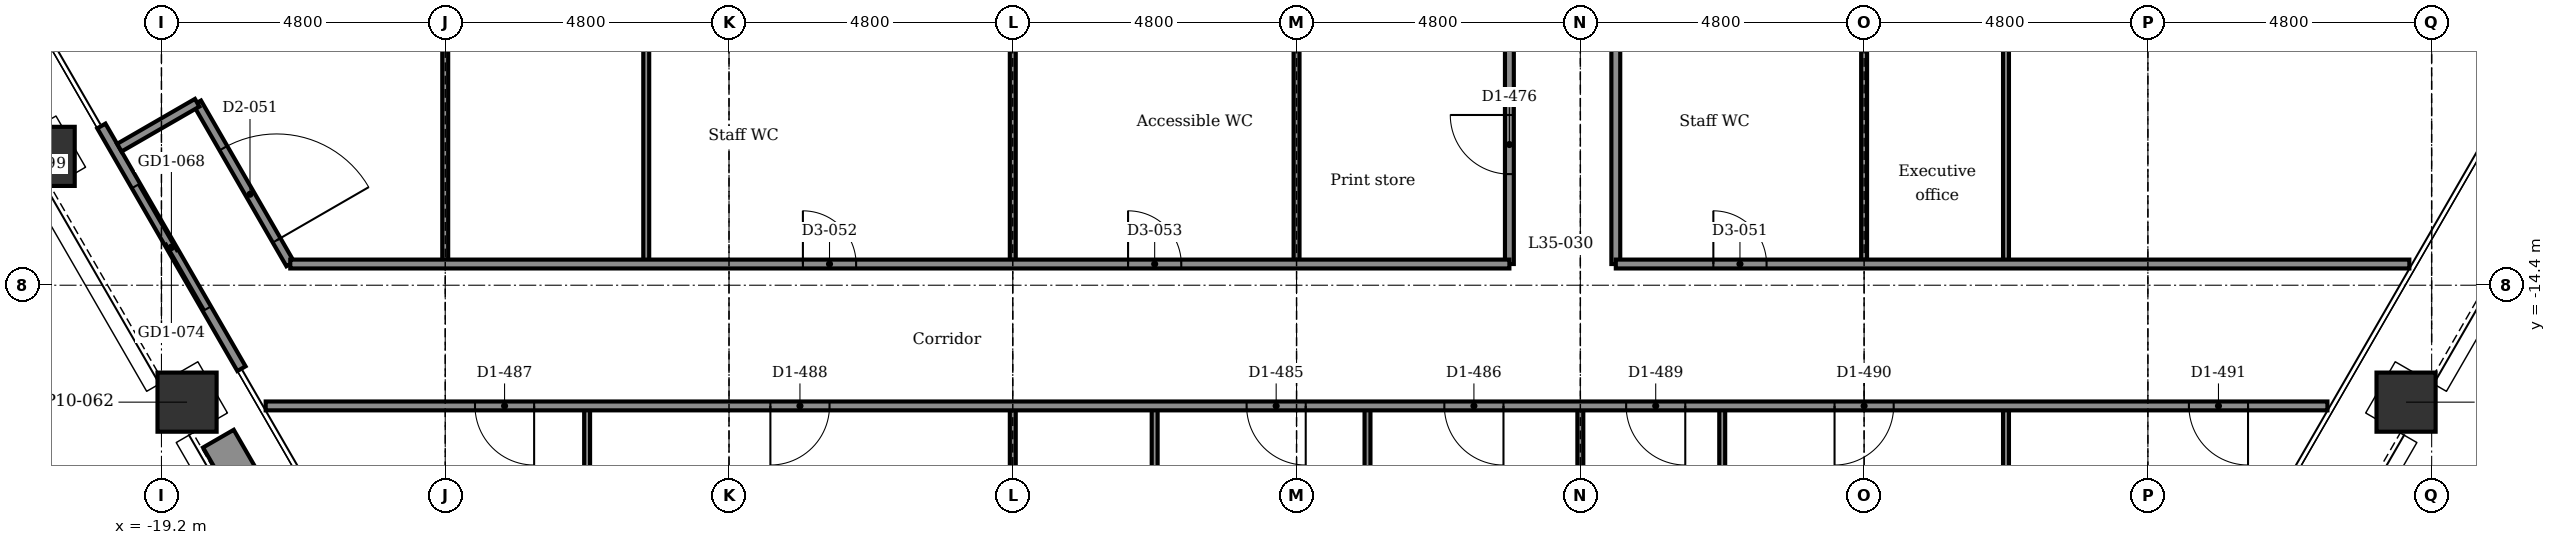
"""IFC4 building model, lengths in metres.
Left out: names, types, materials, properties, quantities, classifications, styles, units other than length and angle.
Written with IfcOpenShell. Run it as: python <this file> out.ifc"""

import sys

from ifc_helpers import new_model, si_unit, direction, frame, frame_2d, origin, origin_2d, place, context, subcontext, project, spatial, rectangle, extrude, element, fill, save


model = new_model("IFC4")
c1 = context("Model", 3, precision=1e-05, world=origin(), true_north=direction((0.0, 1.0)))
c2 = subcontext(c1, "Body", "Model", "MODEL_VIEW")
j1 = project(units=[si_unit("LENGTHUNIT", "METRE"), si_unit("PLANEANGLEUNIT", "RADIAN")], contexts=[c1])
p1 = place(None, origin())
s1 = spatial("IfcSite", under=j1, at=p1, CompositionType="ELEMENT")
p2 = place(p1, origin())
s2 = spatial("IfcBuilding", under=s1, at=p2, CompositionType="ELEMENT")
p3 = place(p2, frame((0.0, 0.0, 170.0)))
s3 = spatial("IfcBuildingStorey", under=s2, at=p3, CompositionType="ELEMENT", Elevation=170.0)
for number, where, z_axis, x_axis in (
    (1, (18.767, -16.378, -0.15), (0.0, 0.0, 1.0), (0.5, 0.866, 0.0)),
    (2, (-18.767, -16.378, -0.15), (0.0, 0.0, 1.0), (0.866, 0.5, 0.0)),
    (3, (-21.167, -12.221, -0.15), (0.0, 0.0, 1.0), (0.866, 0.5, 0.0)),
):
    element("IfcColumn", number, at=place(p3, frame(where, z_axis=z_axis, x_axis=x_axis)), inside=s3, PredefinedType="COLUMN", context=c2, shape_type="SweptSolid", body=[
        extrude(rectangle(XDim=1.0, YDim=1.0, at=origin_2d()), origin(), (0.0, 0.0, 1.0), 3.9),
    ])
p4 = place(p3, frame((-17.847, -15.812, 0.0), z_axis=(0.0, 0.0, 1.0), x_axis=(-0.5000167099, 0.866015756104, 0.0)))
e4 = element("IfcWall", 4, at=p4, inside=s3, PredefinedType="PARTITIONING", context=c2, shape_type="SweptSolid", body=[
    extrude(rectangle(XDim=4.74, YDim=0.16, at=frame_2d((2.37, 0.0))), origin(), (0.0, 0.0, 1.0), 3.75),
])
p5 = place(p4, frame((1.17, 0.0, 0.0)))
e5 = element("IfcOpeningElement", 5, at=p5, cuts=e4, PredefinedType="OPENING", context=c2, shape_type="SweptSolid", body=[
    extrude(rectangle(XDim=2.4, YDim=2.4, at=frame_2d((1.2, 1.2))), frame((0.0, 0.09, 0.0), z_axis=(0.0, -1.0, 0.0), x_axis=(1.0, 0.0, 0.0)), (0.0, 0.0, 1.0), 0.18),
])
p6 = place(p3, frame((-16.637, -19.767, 0.0), z_axis=(0.0, 0.0, 1.0), x_axis=(-0.500028443584, 0.866008981251, 0.0)))
e6 = element("IfcWall", 6, at=p6, inside=s3, PredefinedType="USERDEFINED", context=c2, shape_type="SweptSolid", body=[
    extrude(rectangle(XDim=3.2, YDim=0.6, at=frame_2d((1.6, 0.0))), origin(), (0.0, 0.0, 1.0), 0.7),
])
p7 = place(p3, frame((12.0, -23.271, 0.0), z_axis=(0.0, 0.0, 1.0), x_axis=(0.0, 1.0, 0.0)))
e7 = element("IfcWall", 7, at=p7, inside=s3, PredefinedType="PARTITIONING", context=c2, shape_type="SweptSolid", body=[
    extrude(rectangle(XDim=6.83, YDim=0.1, at=frame_2d((3.415, 0.0))), origin(), (0.0, 0.0, 1.0), 3.75),
])
p8 = place(p3, frame((12.0, -14.042, 0.0), z_axis=(0.0, 0.0, 1.0), x_axis=(0.0, 1.0, 0.0)))
e8 = element("IfcWall", 8, at=p8, inside=s3, PredefinedType="PARTITIONING", context=c2, shape_type="SweptSolid", body=[
    extrude(rectangle(XDim=27.642, YDim=0.1, at=frame_2d((13.821, 0.0))), origin(), (0.0, 0.0, 1.0), 3.75),
])
p9 = place(p3, frame((9.6, -14.042, 0.0), z_axis=(0.0, 0.0, 1.0), x_axis=(0.0, 1.0, 0.0)))
e9 = element("IfcWall", 9, at=p9, inside=s3, PredefinedType="PARTITIONING", context=c2, shape_type="SweptSolid", body=[
    extrude(rectangle(XDim=3.892, YDim=0.1, at=frame_2d((1.946, 0.0))), origin(), (0.0, 0.0, 1.0), 3.066),
])
p10 = place(p3, frame((7.2, -23.271, 0.0), z_axis=(0.0, 0.0, 1.0), x_axis=(0.0, 1.0, 0.0)))
e10 = element("IfcWall", 10, at=p10, inside=s3, PredefinedType="PARTITIONING", context=c2, shape_type="SweptSolid", body=[
    extrude(rectangle(XDim=6.83, YDim=0.1, at=frame_2d((3.415, 0.0))), origin(), (0.0, 0.0, 1.0), 3.75),
])
p11 = place(p3, frame((5.4, -14.042, 0.0), z_axis=(0.0, 0.0, 1.0), x_axis=(0.0, 1.0, 0.0)))
e11 = element("IfcWall", 11, at=p11, inside=s3, PredefinedType="PARTITIONING", context=c2, shape_type="SweptSolid", body=[
    extrude(rectangle(XDim=3.892, YDim=0.15, at=frame_2d((1.946, 0.0))), origin(), (0.0, 0.0, 1.0), 3.75),
])
p12 = place(p3, frame((4.8, -20.042, 0.0), z_axis=(0.0, 0.0, 1.0), x_axis=(0.0, 1.0, 0.0)))
e12 = element("IfcWall", 12, at=p12, inside=s3, PredefinedType="PARTITIONING", context=c2, shape_type="SweptSolid", body=[
    extrude(rectangle(XDim=3.6, YDim=0.1, at=frame_2d((1.8, 0.0))), origin(), (0.0, 0.0, 1.0), 3.066),
])
p13 = place(p3, frame((3.6, -14.042, 0.0), z_axis=(0.0, 0.0, 1.0), x_axis=(0.0, 1.0, 0.0)))
e13 = element("IfcWall", 13, at=p13, inside=s3, PredefinedType="PARTITIONING", context=c2, shape_type="SweptSolid", body=[
    extrude(rectangle(XDim=4.092, YDim=0.15, at=frame_2d((2.046, 0.0))), origin(), (0.0, 0.0, 1.0), 3.75),
])
p14 = place(p13, frame((1.521, 0.0, 0.0)))
e14 = element("IfcOpeningElement", 14, at=p14, cuts=e13, PredefinedType="OPENING", context=c2, shape_type="SweptSolid", body=[
    extrude(rectangle(XDim=1.0, YDim=2.1, at=frame_2d((0.5, 1.05))), frame((0.0, 0.085, 0.0), z_axis=(0.0, -1.0, 0.0), x_axis=(1.0, 0.0, 0.0)), (0.0, 0.0, 1.0), 0.17),
])
p15 = place(p3, frame((1.2, -20.042, 0.0), z_axis=(0.0, 0.0, 1.0), x_axis=(0.0, 1.0, 0.0)))
e15 = element("IfcWall", 15, at=p15, inside=s3, PredefinedType="PARTITIONING", context=c2, shape_type="SweptSolid", body=[
    extrude(rectangle(XDim=3.6, YDim=0.1, at=frame_2d((1.8, 0.0))), origin(), (0.0, 0.0, 1.0), 3.75),
])
p16 = place(p3, frame((0.0, -14.042, 0.0), z_axis=(0.0, 0.0, 1.0), x_axis=(0.0, 1.0, 0.0)))
e16 = element("IfcWall", 16, at=p16, inside=s3, PredefinedType="PARTITIONING", context=c2, shape_type="SweptSolid", body=[
    extrude(rectangle(XDim=4.092, YDim=0.1, at=frame_2d((2.046, 0.0))), origin(), (0.0, 0.0, 1.0), 3.066),
])
p17 = place(p3, frame((-2.4, -20.042, 0.0), z_axis=(0.0, 0.0, 1.0), x_axis=(0.0, 1.0, 0.0)))
e17 = element("IfcWall", 17, at=p17, inside=s3, PredefinedType="PARTITIONING", context=c2, shape_type="SweptSolid", body=[
    extrude(rectangle(XDim=3.6, YDim=0.1, at=frame_2d((1.8, 0.0))), origin(), (0.0, 0.0, 1.0), 3.75),
])
p18 = place(p3, frame((-4.8, -23.271, 0.0), z_axis=(0.0, 0.0, 1.0), x_axis=(0.0, 1.0, 0.0)))
e18 = element("IfcWall", 18, at=p18, inside=s3, PredefinedType="PARTITIONING", context=c2, shape_type="SweptSolid", body=[
    extrude(rectangle(XDim=6.83, YDim=0.1, at=frame_2d((3.415, 0.0))), origin(), (0.0, 0.0, 1.0), 3.066),
])
p19 = place(p3, frame((-4.8, -14.042, 0.0), z_axis=(0.0, 0.0, 1.0), x_axis=(0.0, 1.0, 0.0)))
e19 = element("IfcWall", 19, at=p19, inside=s3, PredefinedType="PARTITIONING", context=c2, shape_type="SweptSolid", body=[
    extrude(rectangle(XDim=4.092, YDim=0.1, at=frame_2d((2.046, 0.0))), origin(), (0.0, 0.0, 1.0), 3.066),
])
p20 = place(p3, frame((-11.0, -14.042, 0.0), z_axis=(0.0, 0.0, 1.0), x_axis=(0.0, 1.0, 0.0)))
e20 = element("IfcWall", 20, at=p20, inside=s3, PredefinedType="PARTITIONING", context=c2, shape_type="SweptSolid", body=[
    extrude(rectangle(XDim=4.042, YDim=0.1, at=frame_2d((2.021, 0.0))), origin(), (0.0, 0.0, 1.0), 3.75),
])
p21 = place(p3, frame((-12.0, -23.271, 0.0), z_axis=(0.0, 0.0, 1.0), x_axis=(0.0, 1.0, 0.0)))
e21 = element("IfcWall", 21, at=p21, inside=s3, PredefinedType="PARTITIONING", context=c2, shape_type="SweptSolid", body=[
    extrude(rectangle(XDim=6.83, YDim=0.1, at=frame_2d((3.415, 0.0))), origin(), (0.0, 0.0, 1.0), 3.75),
])
p22 = place(p3, frame((-14.4, -14.042, 0.0), z_axis=(0.0, 0.0, 1.0), x_axis=(0.0, 1.0, 0.0)))
e22 = element("IfcWall", 22, at=p22, inside=s3, PredefinedType="PARTITIONING", context=c2, shape_type="SweptSolid", body=[
    extrude(rectangle(XDim=4.348, YDim=0.1, at=frame_2d((2.174, 0.0))), origin(), (0.0, 0.0, 1.0), 3.066),
])
p23 = place(p3, frame((-18.596, -11.314, 0.0), z_axis=(0.0, 0.0, 1.0), x_axis=(0.499957296199, -0.866050057432, 0.0)))
e23 = element("IfcWall", 23, at=p23, inside=s3, PredefinedType="PARTITIONING", context=c2, shape_type="SweptSolid", body=[
    extrude(rectangle(XDim=3.15, YDim=0.15, at=frame_2d((1.575, 0.0))), origin(), (0.0, 0.0, 1.0), 3.75),
])
p24 = place(p23, frame((0.887, 0.0, 0.0)))
e24 = element("IfcOpeningElement", 24, at=p24, cuts=e23, PredefinedType="OPENING", context=c2, shape_type="SweptSolid", body=[
    extrude(rectangle(XDim=1.8, YDim=2.1, at=frame_2d((0.9, 1.05))), frame((0.0, 0.085, 0.0), z_axis=(0.0, -1.0, 0.0), x_axis=(1.0, 0.0, 0.0)), (0.0, 0.0, 1.0), 0.17),
])
p25 = place(p3, frame((-19.912, -12.074, 0.0), z_axis=(0.0, 0.0, 1.0), x_axis=(0.866030456496, 0.499991248344, 0.0)))
e25 = element("IfcWall", 25, at=p25, inside=s3, PredefinedType="PARTITIONING", context=c2, shape_type="SweptSolid", body=[
    extrude(rectangle(XDim=1.52, YDim=0.15, at=frame_2d((0.76, 0.0))), origin(), (0.0, 0.0, 1.0), 3.75),
])
p26 = place(p3, frame((-17.437, -16.441, 0.0), z_axis=(0.0, 0.0, 1.0), x_axis=(1.0, 0.0, 0.0)))
e26 = element("IfcWall", 26, at=p26, inside=s3, PredefinedType="PARTITIONING", context=c2, shape_type="SweptSolid", body=[
    extrude(rectangle(XDim=34.874, YDim=0.15, at=frame_2d((17.437, 0.0))), origin(), (0.0, 0.0, 1.0), 3.75),
])
p27 = place(p26, frame((16.592, 0.0, 0.0)))
e27 = element("IfcOpeningElement", 27, at=p27, cuts=e26, PredefinedType="OPENING", context=c2, shape_type="SweptSolid", body=[
    extrude(rectangle(XDim=1.0, YDim=2.1, at=frame_2d((0.5, 1.05))), frame((0.0, 0.085, 0.0), z_axis=(0.0, -1.0, 0.0), x_axis=(1.0, 0.0, 0.0)), (0.0, 0.0, 1.0), 0.17),
])
p28 = place(p26, frame((19.937, 0.0, 0.0)))
e28 = element("IfcOpeningElement", 28, at=p28, cuts=e26, PredefinedType="OPENING", context=c2, shape_type="SweptSolid", body=[
    extrude(rectangle(XDim=1.0, YDim=2.1, at=frame_2d((0.5, 1.05))), frame((0.0, 0.085, 0.0), z_axis=(0.0, -1.0, 0.0), x_axis=(1.0, 0.0, 0.0)), (0.0, 0.0, 1.0), 0.17),
])
p29 = place(p26, frame((3.541, 0.0, 0.0)))
e29 = element("IfcOpeningElement", 29, at=p29, cuts=e26, PredefinedType="OPENING", context=c2, shape_type="SweptSolid", body=[
    extrude(rectangle(XDim=1.0, YDim=2.1, at=frame_2d((0.5, 1.05))), frame((0.0, 0.085, 0.0), z_axis=(0.0, -1.0, 0.0), x_axis=(1.0, 0.0, 0.0)), (0.0, 0.0, 1.0), 0.17),
])
p30 = place(p26, frame((8.537, 0.0, 0.0)))
e30 = element("IfcOpeningElement", 30, at=p30, cuts=e26, PredefinedType="OPENING", context=c2, shape_type="SweptSolid", body=[
    extrude(rectangle(XDim=1.0, YDim=2.1, at=frame_2d((0.5, 1.05))), frame((0.0, 0.085, 0.0), z_axis=(0.0, -1.0, 0.0), x_axis=(1.0, 0.0, 0.0)), (0.0, 0.0, 1.0), 0.17),
])
p31 = place(p26, frame((23.012, 0.0, 0.0)))
e31 = element("IfcOpeningElement", 31, at=p31, cuts=e26, PredefinedType="OPENING", context=c2, shape_type="SweptSolid", body=[
    extrude(rectangle(XDim=1.0, YDim=2.1, at=frame_2d((0.5, 1.05))), frame((0.0, 0.085, 0.0), z_axis=(0.0, -1.0, 0.0), x_axis=(1.0, 0.0, 0.0)), (0.0, 0.0, 1.0), 0.17),
])
p32 = place(p26, frame((26.537, 0.0, 0.0)))
e32 = element("IfcOpeningElement", 32, at=p32, cuts=e26, PredefinedType="OPENING", context=c2, shape_type="SweptSolid", body=[
    extrude(rectangle(XDim=1.0, YDim=2.1, at=frame_2d((0.5, 1.05))), frame((0.0, 0.085, 0.0), z_axis=(0.0, -1.0, 0.0), x_axis=(1.0, 0.0, 0.0)), (0.0, 0.0, 1.0), 0.17),
])
p33 = place(p26, frame((32.531, 0.0, 0.0)))
e33 = element("IfcOpeningElement", 33, at=p33, cuts=e26, PredefinedType="OPENING", context=c2, shape_type="SweptSolid", body=[
    extrude(rectangle(XDim=1.0, YDim=2.1, at=frame_2d((0.5, 1.05))), frame((0.0, 0.085, 0.0), z_axis=(0.0, -1.0, 0.0), x_axis=(1.0, 0.0, 0.0)), (0.0, 0.0, 1.0), 0.17),
])
p34 = place(p3, frame((-17.021, -14.042, 0.0), z_axis=(0.0, 0.0, 1.0), x_axis=(1.0, 0.0, 0.0)))
e34 = element("IfcWall", 34, at=p34, inside=s3, PredefinedType="PARTITIONING", context=c2, shape_type="SweptSolid", body=[
    extrude(rectangle(XDim=20.621, YDim=0.15, at=frame_2d((10.311, 0.0))), origin(), (0.0, 0.0, 1.0), 3.75),
])
p35 = place(p34, frame((8.671, 0.0, 0.0)))
e35 = element("IfcOpeningElement", 35, at=p35, cuts=e34, PredefinedType="OPENING", context=c2, shape_type="SweptSolid", body=[
    extrude(rectangle(XDim=0.9, YDim=2.1, at=frame_2d((0.45, 1.05))), frame((0.0, 0.085, 0.0), z_axis=(0.0, -1.0, 0.0), x_axis=(1.0, 0.0, 0.0)), (0.0, 0.0, 1.0), 0.17),
])
p36 = place(p34, frame((14.171, 0.0, 0.0)))
e36 = element("IfcOpeningElement", 36, at=p36, cuts=e34, PredefinedType="OPENING", context=c2, shape_type="SweptSolid", body=[
    extrude(rectangle(XDim=0.9, YDim=2.1, at=frame_2d((0.45, 1.05))), frame((0.0, 0.085, 0.0), z_axis=(0.0, -1.0, 0.0), x_axis=(1.0, 0.0, 0.0)), (0.0, 0.0, 1.0), 0.17),
])
p37 = place(p3, frame((5.4, -14.042, 0.0), z_axis=(0.0, 0.0, 1.0), x_axis=(1.0, 0.0, 0.0)))
e37 = element("IfcWall", 37, at=p37, inside=s3, PredefinedType="PARTITIONING", context=c2, shape_type="SweptSolid", body=[
    extrude(rectangle(XDim=13.423, YDim=0.15, at=frame_2d((6.711, 0.0))), origin(), (0.0, 0.0, 1.0), 3.75),
])
p38 = place(p37, frame((1.65, 0.0, 0.0)))
e38 = element("IfcOpeningElement", 38, at=p38, cuts=e37, PredefinedType="OPENING", context=c2, shape_type="SweptSolid", body=[
    extrude(rectangle(XDim=0.9, YDim=2.1, at=frame_2d((0.45, 1.05))), frame((0.0, 0.085, 0.0), z_axis=(0.0, -1.0, 0.0), x_axis=(1.0, 0.0, 0.0)), (0.0, 0.0, 1.0), 0.17),
])
p39 = place(p5, origin())
e39 = element("IfcDoor", 39, at=p39, inside=s3, OperationType="DOUBLE_DOOR_SLIDING", PredefinedType="DOOR", context=c2, shape_type="SweptSolid", body=[
    extrude(rectangle(XDim=2.4, YDim=2.4, at=frame_2d((1.2, 1.2))), frame((0.0, 0.025, 0.0), z_axis=(0.0, -1.0, 0.0), x_axis=(1.0, 0.0, 0.0)), (0.0, 0.0, 1.0), 0.05),
])
fill(e5, e39)
p40 = place(p38, origin())
e40 = element("IfcDoor", 40, at=p40, inside=s3, OperationType="SINGLE_SWING_LEFT", PredefinedType="DOOR", context=c2, shape_type="SweptSolid", body=[
    extrude(rectangle(XDim=0.9, YDim=2.1, at=frame_2d((0.45, 1.05))), frame((0.0, 0.025, 0.0), z_axis=(0.0, -1.0, 0.0), x_axis=(1.0, 0.0, 0.0)), (0.0, 0.0, 1.0), 0.05),
])
fill(e38, e40)
p41 = place(p35, origin())
e41 = element("IfcDoor", 41, at=p41, inside=s3, OperationType="SINGLE_SWING_LEFT", PredefinedType="DOOR", context=c2, shape_type="SweptSolid", body=[
    extrude(rectangle(XDim=0.9, YDim=2.1, at=frame_2d((0.45, 1.05))), frame((0.0, 0.025, 0.0), z_axis=(0.0, -1.0, 0.0), x_axis=(1.0, 0.0, 0.0)), (0.0, 0.0, 1.0), 0.05),
])
fill(e35, e41)
p42 = place(p36, origin())
e42 = element("IfcDoor", 42, at=p42, inside=s3, OperationType="SINGLE_SWING_LEFT", PredefinedType="DOOR", context=c2, shape_type="SweptSolid", body=[
    extrude(rectangle(XDim=0.9, YDim=2.1, at=frame_2d((0.45, 1.05))), frame((0.0, 0.025, 0.0), z_axis=(0.0, -1.0, 0.0), x_axis=(1.0, 0.0, 0.0)), (0.0, 0.0, 1.0), 0.05),
])
fill(e36, e42)
p43 = place(p14, origin())
e43 = element("IfcDoor", 43, at=p43, inside=s3, OperationType="SINGLE_SWING_RIGHT", PredefinedType="DOOR", context=c2, shape_type="SweptSolid", body=[
    extrude(rectangle(XDim=1.0, YDim=2.1, at=frame_2d((0.5, 1.05))), frame((0.0, 0.025, 0.0), z_axis=(0.0, -1.0, 0.0), x_axis=(1.0, 0.0, 0.0)), (0.0, 0.0, 1.0), 0.05),
])
fill(e14, e43)
p44 = place(p27, frame((1.0, 0.0, 0.0), z_axis=(0.0, 0.0, 1.0), x_axis=(-1.0, 0.0, 0.0)))
e44 = element("IfcDoor", 44, at=p44, inside=s3, OperationType="SINGLE_SWING_RIGHT", PredefinedType="DOOR", context=c2, shape_type="SweptSolid", body=[
    extrude(rectangle(XDim=1.0, YDim=2.1, at=frame_2d((0.5, 1.05))), frame((0.0, 0.025, 0.0), z_axis=(0.0, -1.0, 0.0), x_axis=(1.0, 0.0, 0.0)), (0.0, 0.0, 1.0), 0.05),
])
fill(e27, e44)
p45 = place(p28, frame((1.0, 0.0, 0.0), z_axis=(0.0, 0.0, 1.0), x_axis=(-1.0, 0.0, 0.0)))
e45 = element("IfcDoor", 45, at=p45, inside=s3, OperationType="SINGLE_SWING_RIGHT", PredefinedType="DOOR", context=c2, shape_type="SweptSolid", body=[
    extrude(rectangle(XDim=1.0, YDim=2.1, at=frame_2d((0.5, 1.05))), frame((0.0, 0.025, 0.0), z_axis=(0.0, -1.0, 0.0), x_axis=(1.0, 0.0, 0.0)), (0.0, 0.0, 1.0), 0.05),
])
fill(e28, e45)
p46 = place(p29, frame((1.0, 0.0, 0.0), z_axis=(0.0, 0.0, 1.0), x_axis=(-1.0, 0.0, 0.0)))
e46 = element("IfcDoor", 46, at=p46, inside=s3, OperationType="SINGLE_SWING_RIGHT", PredefinedType="DOOR", context=c2, shape_type="SweptSolid", body=[
    extrude(rectangle(XDim=1.0, YDim=2.1, at=frame_2d((0.5, 1.05))), frame((0.0, 0.025, 0.0), z_axis=(0.0, -1.0, 0.0), x_axis=(1.0, 0.0, 0.0)), (0.0, 0.0, 1.0), 0.05),
])
fill(e29, e46)
p47 = place(p30, frame((1.0, 0.0, 0.0), z_axis=(0.0, 0.0, 1.0), x_axis=(-1.0, 0.0, 0.0)))
e47 = element("IfcDoor", 47, at=p47, inside=s3, OperationType="SINGLE_SWING_LEFT", PredefinedType="DOOR", context=c2, shape_type="SweptSolid", body=[
    extrude(rectangle(XDim=1.0, YDim=2.1, at=frame_2d((0.5, 1.05))), frame((0.0, 0.025, 0.0), z_axis=(0.0, -1.0, 0.0), x_axis=(1.0, 0.0, 0.0)), (0.0, 0.0, 1.0), 0.05),
])
fill(e30, e47)
p48 = place(p31, frame((1.0, 0.0, 0.0), z_axis=(0.0, 0.0, 1.0), x_axis=(-1.0, 0.0, 0.0)))
e48 = element("IfcDoor", 48, at=p48, inside=s3, OperationType="SINGLE_SWING_RIGHT", PredefinedType="DOOR", context=c2, shape_type="SweptSolid", body=[
    extrude(rectangle(XDim=1.0, YDim=2.1, at=frame_2d((0.5, 1.05))), frame((0.0, 0.025, 0.0), z_axis=(0.0, -1.0, 0.0), x_axis=(1.0, 0.0, 0.0)), (0.0, 0.0, 1.0), 0.05),
])
fill(e31, e48)
p49 = place(p32, frame((1.0, 0.0, 0.0), z_axis=(0.0, 0.0, 1.0), x_axis=(-1.0, 0.0, 0.0)))
e49 = element("IfcDoor", 49, at=p49, inside=s3, OperationType="SINGLE_SWING_LEFT", PredefinedType="DOOR", context=c2, shape_type="SweptSolid", body=[
    extrude(rectangle(XDim=1.0, YDim=2.1, at=frame_2d((0.5, 1.05))), frame((0.0, 0.025, 0.0), z_axis=(0.0, -1.0, 0.0), x_axis=(1.0, 0.0, 0.0)), (0.0, 0.0, 1.0), 0.05),
])
fill(e32, e49)
p50 = place(p33, frame((1.0, 0.0, 0.0), z_axis=(0.0, 0.0, 1.0), x_axis=(-1.0, 0.0, 0.0)))
e50 = element("IfcDoor", 50, at=p50, inside=s3, OperationType="SINGLE_SWING_RIGHT", PredefinedType="DOOR", context=c2, shape_type="SweptSolid", body=[
    extrude(rectangle(XDim=1.0, YDim=2.1, at=frame_2d((0.5, 1.05))), frame((0.0, 0.025, 0.0), z_axis=(0.0, -1.0, 0.0), x_axis=(1.0, 0.0, 0.0)), (0.0, 0.0, 1.0), 0.05),
])
fill(e33, e50)
p51 = place(p24, origin())
e51 = element("IfcDoor", 51, at=p51, inside=s3, OperationType="SINGLE_SWING_RIGHT", PredefinedType="DOOR", context=c2, shape_type="SweptSolid", body=[
    extrude(rectangle(XDim=1.8, YDim=2.1, at=frame_2d((0.9, 1.05))), frame((0.0, 0.025, 0.0), z_axis=(0.0, -1.0, 0.0), x_axis=(1.0, 0.0, 0.0)), (0.0, 0.0, 1.0), 0.05),
])
fill(e24, e51)
save(model, sys.argv[1])
